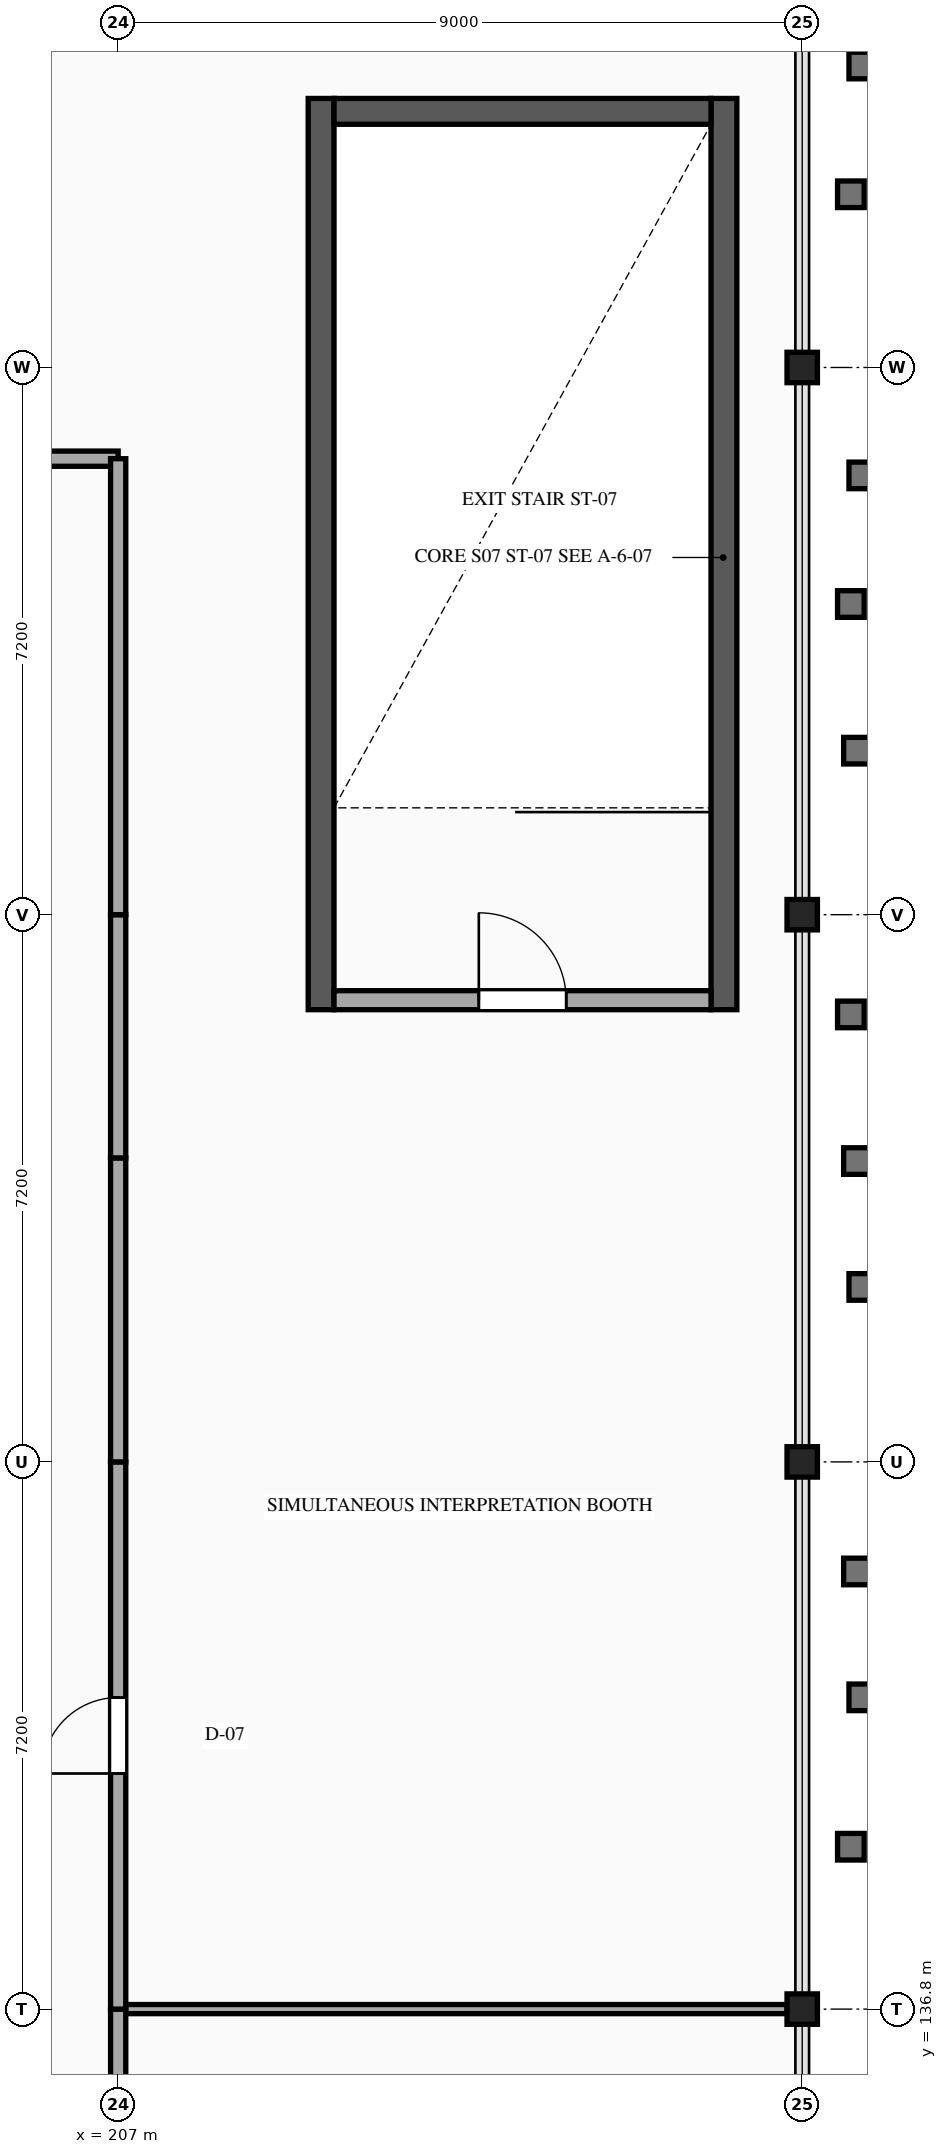
"""IFC4 building model, lengths in metres.
Left out: names, types, materials, properties, quantities, classifications, styles, units other than length and angle.
Written with IfcOpenShell. Run it as: python <this file> out.ifc"""

import sys

from ifc_helpers import new_model, si_unit, direction, frame, frame_2d, origin, origin_2d, place, context, subcontext, project, spatial, rectangle, hollow_rectangle, extrude, element, fill, save


model = new_model("IFC4")
c1 = context("Model", 3, precision=1e-05, world=origin(), true_north=direction((0.0, 1.0)))
c2 = subcontext(c1, "Body", "Model", "MODEL_VIEW")
j1 = project(units=[si_unit("LENGTHUNIT", "METRE"), si_unit("PLANEANGLEUNIT", "RADIAN")], contexts=[c1])
p1 = place(None, origin())
s1 = spatial("IfcSite", under=j1, at=p1, CompositionType="ELEMENT")
p2 = place(p1, origin())
s2 = spatial("IfcBuilding", under=s1, at=p2, CompositionType="ELEMENT")
p3 = place(p2, frame((0.0, 0.0, 10.8)))
s3 = spatial("IfcBuildingStorey", under=s2, at=p3, CompositionType="ELEMENT", Elevation=10.8)
for number, where, z_axis, x_axis in (
    (1, (216.0, 136.8, 0.0), (0.0, 0.0, 1.0), (1.0, 0.0, 0.0)),
    (2, (216.0, 144.0, 0.0), (0.0, 0.0, 1.0), (1.0, 0.0, 0.0)),
    (3, (216.0, 151.2, 0.0), (0.0, 0.0, 1.0), (1.0, 0.0, 0.0)),
    (4, (216.0, 158.4, 0.0), (0.0, 0.0, 1.0), (1.0, 0.0, 0.0)),
):
    element("IfcColumn", number, at=place(p3, frame(where, z_axis=z_axis, x_axis=x_axis)), inside=s3, PredefinedType="COLUMN", context=c2, shape_type="SweptSolid", body=[
        extrude(hollow_rectangle(XDim=0.4, YDim=0.4, WallThickness=0.016, at=origin_2d()), origin(), (0.0, 0.0, 1.0), 4.5),
    ])
for number, where, z_axis, x_axis in (
    (5, (209.67, 149.95, 0.0), (0.0, 0.0, 1.0), (0.0, 1.0, 0.0)),
    (6, (214.97, 161.94, 0.0), (0.0, 0.0, 1.0), (0.0, -1.0, 0.0)),
):
    element("IfcWall", number, at=place(p3, frame(where, z_axis=z_axis, x_axis=x_axis)), inside=s3, PredefinedType="SHEAR", context=c2, shape_type="SweptSolid", body=[
        extrude(rectangle(XDim=11.99, YDim=0.34, at=frame_2d((5.995, 0.0))), origin(), (0.0, 0.0, 1.0), 4.26),
    ])
p4 = place(p3, frame((209.84, 161.77, 0.0), z_axis=(0.0, 0.0, 1.0), x_axis=(1.0, 0.0, 0.0)))
e7 = element("IfcWall", 7, at=p4, inside=s3, PredefinedType="SHEAR", context=c2, shape_type="SweptSolid", body=[
    extrude(rectangle(XDim=4.96, YDim=0.34, at=frame_2d((2.48, 0.0))), origin(), (0.0, 0.0, 1.0), 4.26),
])
p5 = place(p3, frame((209.84, 150.075, 0.0), z_axis=(0.0, 0.0, 1.0), x_axis=(1.0, 0.0, 0.0)))
e8 = element("IfcWall", 8, at=p5, inside=s3, PredefinedType="STANDARD", context=c2, shape_type="SweptSolid", body=[
    extrude(rectangle(XDim=4.96, YDim=0.25, at=frame_2d((2.48, 0.0))), origin(), (0.0, 0.0, 1.0), 4.22),
])
p6 = place(p5, frame((1.905, 0.0, 0.0)))
e9 = element("IfcOpeningElement", 9, at=p6, cuts=e8, PredefinedType="OPENING", context=c2, shape_type="SweptSolid", body=[
    extrude(rectangle(XDim=1.15, YDim=2.2, at=frame_2d((0.575, 1.1))), frame((0.0, 0.135, 0.0), z_axis=(0.0, -1.0, 0.0), x_axis=(1.0, 0.0, 0.0)), (0.0, 0.0, 1.0), 0.27),
])
p7 = place(p3, frame((207.0, 136.8, 0.0), z_axis=(0.0, 0.0, 1.0), x_axis=(1.0, 0.0, 0.0)))
e10 = element("IfcWall", 10, at=p7, inside=s3, PredefinedType="PARTITIONING", context=c2, shape_type="SweptSolid", body=[
    extrude(rectangle(XDim=8.802, YDim=0.12, at=frame_2d((4.401, 0.0))), origin(), (0.0, 0.0, 1.0), 4.22),
])
p8 = place(p3, frame((198.0, 157.2, 0.0), z_axis=(0.0, 0.0, 1.0), x_axis=(1.0, 0.0, 0.0)))
e11 = element("IfcWall", 11, at=p8, inside=s3, PredefinedType="PARTITIONING", context=c2, shape_type="SweptSolid", body=[
    extrude(rectangle(XDim=9.0, YDim=0.2, at=frame_2d((4.5, 0.0))), origin(), (0.0, 0.0, 1.0), 4.22),
])
p9 = place(p3, frame((207.0, 129.6, 0.0), z_axis=(0.0, 0.0, 1.0), x_axis=(0.0, 1.0, 0.0)))
e12 = element("IfcWall", 12, at=p9, inside=s3, PredefinedType="PARTITIONING", context=c2, shape_type="SweptSolid", body=[
    extrude(rectangle(XDim=7.2, YDim=0.2, at=frame_2d((3.6, 0.0))), origin(), (0.0, 0.0, 1.0), 4.22),
])
p10 = place(p3, frame((207.0, 136.8, 0.0), z_axis=(0.0, 0.0, 1.0), x_axis=(0.0, 1.0, 0.0)))
e13 = element("IfcWall", 13, at=p10, inside=s3, PredefinedType="PARTITIONING", context=c2, shape_type="SweptSolid", body=[
    extrude(rectangle(XDim=7.2, YDim=0.2, at=frame_2d((3.6, 0.0))), origin(), (0.0, 0.0, 1.0), 4.22),
])
p11 = place(p10, frame((3.1, 0.0, 0.0)))
e14 = element("IfcOpeningElement", 14, at=p11, cuts=e13, PredefinedType="OPENING", context=c2, shape_type="SweptSolid", body=[
    extrude(rectangle(XDim=1.0, YDim=2.15, at=frame_2d((0.5, 1.075))), frame((0.0, 0.11, 0.0), z_axis=(0.0, -1.0, 0.0), x_axis=(1.0, 0.0, 0.0)), (0.0, 0.0, 1.0), 0.22),
])
p12 = place(p3, frame((207.0, 144.0, 0.0), z_axis=(0.0, 0.0, 1.0), x_axis=(0.0, 1.0, 0.0)))
e15 = element("IfcWall", 15, at=p12, inside=s3, PredefinedType="PARTITIONING", context=c2, shape_type="SweptSolid", body=[
    extrude(rectangle(XDim=4.0, YDim=0.2, at=frame_2d((2.0, 0.0))), origin(), (0.0, 0.0, 1.0), 4.22),
])
p13 = place(p3, frame((207.0, 148.0, 0.0), z_axis=(0.0, 0.0, 1.0), x_axis=(0.0, 1.0, 0.0)))
e16 = element("IfcWall", 16, at=p13, inside=s3, PredefinedType="PARTITIONING", context=c2, shape_type="SweptSolid", body=[
    extrude(rectangle(XDim=3.2, YDim=0.2, at=frame_2d((1.6, 0.0))), origin(), (0.0, 0.0, 1.0), 4.22),
])
p14 = place(p3, frame((207.0, 151.2, 0.0), z_axis=(0.0, 0.0, 1.0), x_axis=(0.0, 1.0, 0.0)))
e17 = element("IfcWall", 17, at=p14, inside=s3, PredefinedType="PARTITIONING", context=c2, shape_type="SweptSolid", body=[
    extrude(rectangle(XDim=6.0, YDim=0.2, at=frame_2d((3.0, 0.0))), origin(), (0.0, 0.0, 1.0), 4.22),
])
p15 = place(p6, origin())
e18 = element("IfcDoor", 18, at=p15, inside=s3, OperationType="SINGLE_SWING_LEFT", PredefinedType="DOOR", context=c2, shape_type="SweptSolid", body=[
    extrude(rectangle(XDim=1.15, YDim=2.2, at=frame_2d((0.575, 1.1))), frame((0.0, 0.025, 0.0), z_axis=(0.0, -1.0, 0.0), x_axis=(1.0, 0.0, 0.0)), (0.0, 0.0, 1.0), 0.05),
])
fill(e9, e18)
p16 = place(p11, origin())
e19 = element("IfcDoor", 19, at=p16, inside=s3, OperationType="SINGLE_SWING_LEFT", PredefinedType="DOOR", context=c2, shape_type="SweptSolid", body=[
    extrude(rectangle(XDim=1.0, YDim=2.15, at=frame_2d((0.5, 1.075))), frame((0.0, 0.025, 0.0), z_axis=(0.0, -1.0, 0.0), x_axis=(1.0, 0.0, 0.0)), (0.0, 0.0, 1.0), 0.05),
])
fill(e14, e19)
save(model, sys.argv[1])
